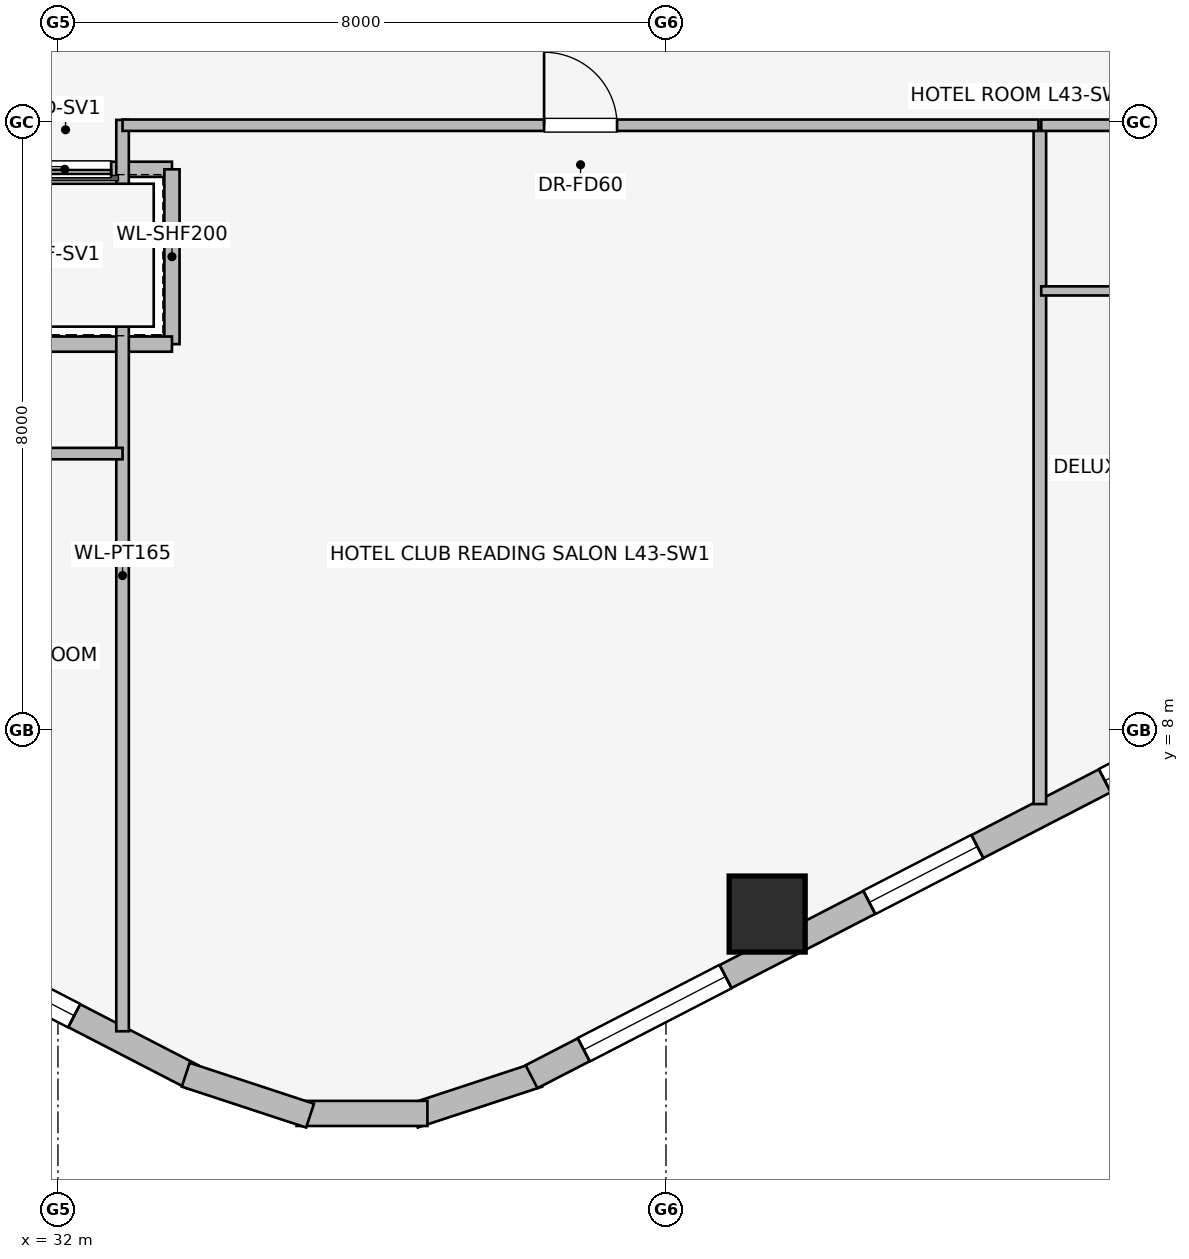
"""IFC4 building model, lengths in metres.
Left out: names, types, materials, properties, quantities, classifications, styles, units other than length and angle.
Written with IfcOpenShell. Run it as: python <this file> out.ifc"""

import sys

from ifc_helpers import new_model, si_unit, direction, frame, frame_2d, origin, origin_2d, place, context, subcontext, project, spatial, rectangle, extrude, element, fill, save


model = new_model("IFC4")
c1 = context("Model", 3, precision=1e-05, world=origin(), true_north=direction((0.0, 1.0)))
c2 = subcontext(c1, "Body", "Model", "MODEL_VIEW")
j1 = project(units=[si_unit("LENGTHUNIT", "METRE"), si_unit("PLANEANGLEUNIT", "RADIAN")], contexts=[c1])
p1 = place(None, origin())
s1 = spatial("IfcSite", under=j1, at=p1, CompositionType="ELEMENT")
p2 = place(p1, origin())
s2 = spatial("IfcBuilding", under=s1, at=p2, CompositionType="ELEMENT")
p3 = place(p2, frame((0.0, 0.0, 160.2)))
s3 = spatial("IfcBuildingStorey", under=s2, at=p3, CompositionType="ELEMENT", Elevation=160.2)
p4 = place(p3, frame((41.331, 5.582, 0.0), z_axis=(0.0, 0.0, 1.0), x_axis=(1.0, 0.0, 0.0)))
e1 = element("IfcColumn", 1, at=p4, inside=s3, PredefinedType="COLUMN", context=c2, shape_type="SweptSolid", body=[
    extrude(rectangle(XDim=1.0, YDim=1.0, at=origin_2d()), origin(), (0.0, 0.0, 1.0), 3.45),
])
p5 = place(p3, frame((33.769, 3.442, 0.0), z_axis=(0.0, 0.0, 1.0), x_axis=(-0.888613612362, 0.458656568606, 0.0)))
e2 = element("IfcWall", 2, at=p5, inside=s3, PredefinedType="STANDARD", context=c2, shape_type="SweptSolid", body=[
    extrude(rectangle(XDim=18.681, YDim=0.34, at=frame_2d((9.34, 0.0))), origin(), (0.0, 0.0, 1.0), 3.03),
])
p6 = place(p5, frame((1.75, 0.0, 0.75)))
e3 = element("IfcOpeningElement", 3, at=p6, cuts=e2, PredefinedType="OPENING", context=c2, shape_type="SweptSolid", body=[
    extrude(rectangle(XDim=1.05, YDim=1.4, at=frame_2d((0.525, 0.7))), frame((0.0, 0.18, 0.0), z_axis=(0.0, -1.0, 0.0), x_axis=(1.0, 0.0, 0.0)), (0.0, 0.0, 1.0), 0.36),
])
p7 = place(p5, frame((7.007, 0.0, 0.75)))
e4 = element("IfcOpeningElement", 4, at=p7, cuts=e2, PredefinedType="OPENING", context=c2, shape_type="SweptSolid", body=[
    extrude(rectangle(XDim=2.1, YDim=1.5, at=frame_2d((1.05, 0.75))), frame((0.0, 0.18, 0.0), z_axis=(0.0, -1.0, 0.0), x_axis=(1.0, 0.0, 0.0)), (0.0, 0.0, 1.0), 0.36),
])
p8 = place(p5, frame((11.774, 0.0, 0.75)))
e5 = element("IfcOpeningElement", 5, at=p8, cuts=e2, PredefinedType="OPENING", context=c2, shape_type="SweptSolid", body=[
    extrude(rectangle(XDim=1.6, YDim=1.55, at=frame_2d((0.8, 0.775))), frame((0.0, 0.18, 0.0), z_axis=(0.0, -1.0, 0.0), x_axis=(1.0, 0.0, 0.0)), (0.0, 0.0, 1.0), 0.36),
])
p9 = place(p5, frame((16.111, 0.0, 0.75)))
e6 = element("IfcOpeningElement", 6, at=p9, cuts=e2, PredefinedType="OPENING", context=c2, shape_type="SweptSolid", body=[
    extrude(rectangle(XDim=1.05, YDim=1.4, at=frame_2d((0.525, 0.7))), frame((0.0, 0.18, 0.0), z_axis=(0.0, -1.0, 0.0), x_axis=(1.0, 0.0, 0.0)), (0.0, 0.0, 1.0), 0.36),
])
for number, where, z_axis, x_axis in (
    (7, (38.319, 3.468, 0.0), (0.0, 0.0, 1.0), (-0.95, -0.312, 0.0)),
    (8, (36.861, 2.959, 0.0), (0.0, 0.0, 1.0), (-1.0, 0.0, 0.0)),
    (9, (35.317, 2.93, 0.0), (0.0, 0.0, 1.0), (-0.95, 0.312, 0.0)),
):
    element("IfcWall", number, at=place(p3, frame(where, z_axis=z_axis, x_axis=x_axis)), inside=s3, PredefinedType="STANDARD", context=c2, shape_type="SweptSolid", body=[
        extrude(rectangle(XDim=1.722, YDim=0.33, at=frame_2d((0.861, 0.0))), origin(), (0.0, 0.0, 1.0), 3.03),
    ])
p10 = place(p3, frame((54.831, 12.01, 0.0), z_axis=(0.0, 0.0, 1.0), x_axis=(-0.888613612362, -0.458656568606, 0.0)))
e10 = element("IfcWall", 10, at=p10, inside=s3, PredefinedType="STANDARD", context=c2, shape_type="SweptSolid", body=[
    extrude(rectangle(XDim=18.681, YDim=0.34, at=frame_2d((9.34, 0.0))), origin(), (0.0, 0.0, 1.0), 3.03),
])
p11 = place(p10, frame((1.023, 0.0, 0.75)))
e11 = element("IfcOpeningElement", 11, at=p11, cuts=e10, PredefinedType="OPENING", context=c2, shape_type="SweptSolid", body=[
    extrude(rectangle(XDim=1.6, YDim=1.55, at=frame_2d((0.8, 0.775))), frame((0.0, 0.18, 0.0), z_axis=(0.0, -1.0, 0.0), x_axis=(1.0, 0.0, 0.0)), (0.0, 0.0, 1.0), 0.36),
])
p12 = place(p10, frame((4.914, 0.0, 0.75)))
e12 = element("IfcOpeningElement", 12, at=p12, cuts=e10, PredefinedType="OPENING", context=c2, shape_type="SweptSolid", body=[
    extrude(rectangle(XDim=2.1, YDim=1.5, at=frame_2d((1.05, 0.75))), frame((0.0, 0.18, 0.0), z_axis=(0.0, -1.0, 0.0), x_axis=(1.0, 0.0, 0.0)), (0.0, 0.0, 1.0), 0.36),
])
p13 = place(p10, frame((8.092, 0.0, 0.75)))
e13 = element("IfcOpeningElement", 13, at=p13, cuts=e10, PredefinedType="OPENING", context=c2, shape_type="SweptSolid", body=[
    extrude(rectangle(XDim=2.1, YDim=1.5, at=frame_2d((1.05, 0.75))), frame((0.0, 0.18, 0.0), z_axis=(0.0, -1.0, 0.0), x_axis=(1.0, 0.0, 0.0)), (0.0, 0.0, 1.0), 0.36),
])
p14 = place(p10, frame((12.08, 0.0, 0.75)))
e14 = element("IfcOpeningElement", 14, at=p14, cuts=e10, PredefinedType="OPENING", context=c2, shape_type="SweptSolid", body=[
    extrude(rectangle(XDim=1.6, YDim=1.55, at=frame_2d((0.8, 0.775))), frame((0.0, 0.18, 0.0), z_axis=(0.0, -1.0, 0.0), x_axis=(1.0, 0.0, 0.0)), (0.0, 0.0, 1.0), 0.36),
])
p15 = place(p10, frame((15.808, 0.0, 0.75)))
e15 = element("IfcOpeningElement", 15, at=p15, cuts=e10, PredefinedType="OPENING", context=c2, shape_type="SweptSolid", body=[
    extrude(rectangle(XDim=2.1, YDim=1.5, at=frame_2d((1.05, 0.75))), frame((0.0, 0.18, 0.0), z_axis=(0.0, -1.0, 0.0), x_axis=(1.0, 0.0, 0.0)), (0.0, 0.0, 1.0), 0.36),
])
p16 = place(p3, frame((33.5, 15.38, 0.0), z_axis=(0.0, 0.0, 1.0), x_axis=(-1.0, 0.0, 0.0)))
e16 = element("IfcWall", 16, at=p16, inside=s3, PredefinedType="PARTITIONING", context=c2, shape_type="SweptSolid", body=[
    extrude(rectangle(XDim=2.82, YDim=0.2, at=frame_2d((1.41, 0.0))), origin(), (0.0, 0.0, 1.0), 3.03),
])
p17 = place(p16, frame((0.8, 0.0, 0.0)))
e17 = element("IfcOpeningElement", 17, at=p17, cuts=e16, PredefinedType="OPENING", context=c2, shape_type="SweptSolid", body=[
    extrude(rectangle(XDim=1.2, YDim=2.2, at=frame_2d((0.6, 1.1))), frame((0.0, 0.11, 0.0), z_axis=(0.0, -1.0, 0.0), x_axis=(1.0, 0.0, 0.0)), (0.0, 0.0, 1.0), 0.22),
])
p18 = place(p3, frame((33.5, 13.08, 0.0), z_axis=(0.0, 0.0, 1.0), x_axis=(0.0, 1.0, 0.0)))
e18 = element("IfcWall", 18, at=p18, inside=s3, PredefinedType="PARTITIONING", context=c2, shape_type="SweptSolid", body=[
    extrude(rectangle(XDim=2.3, YDim=0.2, at=frame_2d((1.15, 0.0))), origin(), (0.0, 0.0, 1.0), 3.03),
])
p19 = place(p3, frame((30.879, 13.08, 0.0), z_axis=(0.0, 0.0, 1.0), x_axis=(1.0, 0.0, 0.0)))
e19 = element("IfcWall", 19, at=p19, inside=s3, PredefinedType="PARTITIONING", context=c2, shape_type="SweptSolid", body=[
    extrude(rectangle(XDim=2.621, YDim=0.2, at=frame_2d((1.311, 0.0))), origin(), (0.0, 0.0, 1.0), 3.03),
])
p20 = place(p3, frame((32.85, 4.04, 0.0), z_axis=(0.0, 0.0, 1.0), x_axis=(0.0, 1.0, 0.0)))
e20 = element("IfcWall", 20, at=p20, inside=s3, PredefinedType="PARTITIONING", context=c2, shape_type="SweptSolid", body=[
    extrude(rectangle(XDim=11.99, YDim=0.165, at=frame_2d((5.995, 0.0))), origin(), (0.0, 0.0, 1.0), 3.03),
])
p21 = place(p3, frame((18.126, 11.64, 0.0), z_axis=(0.0, 0.0, 1.0), x_axis=(1.0, 0.0, 0.0)))
e21 = element("IfcWall", 21, at=p21, inside=s3, PredefinedType="PARTITIONING", context=c2, shape_type="SweptSolid", body=[
    extrude(rectangle(XDim=14.724, YDim=0.15, at=frame_2d((7.362, 0.0))), origin(), (0.0, 0.0, 1.0), 3.03),
])
p22 = place(p21, frame((4.274, 0.0, 0.0)))
e22 = element("IfcOpeningElement", 22, at=p22, cuts=e21, PredefinedType="OPENING", context=c2, shape_type="SweptSolid", body=[
    extrude(rectangle(XDim=0.9, YDim=2.0, at=frame_2d((0.45, 1.0))), frame((0.0, 0.085, 0.0), z_axis=(0.0, -1.0, 0.0), x_axis=(1.0, 0.0, 0.0)), (0.0, 0.0, 1.0), 0.17),
])
p23 = place(p21, frame((7.724, 0.0, 0.0)))
e23 = element("IfcOpeningElement", 23, at=p23, cuts=e21, PredefinedType="OPENING", context=c2, shape_type="SweptSolid", body=[
    extrude(rectangle(XDim=0.9, YDim=2.0, at=frame_2d((0.45, 1.0))), frame((0.0, 0.085, 0.0), z_axis=(0.0, -1.0, 0.0), x_axis=(1.0, 0.0, 0.0)), (0.0, 0.0, 1.0), 0.17),
])
p24 = place(p3, frame((44.919, 7.029, 0.0), z_axis=(0.0, 0.0, 1.0), x_axis=(0.0, 1.0, 0.0)))
e24 = element("IfcWall", 24, at=p24, inside=s3, PredefinedType="PARTITIONING", context=c2, shape_type="SweptSolid", body=[
    extrude(rectangle(XDim=8.901, YDim=0.165, at=frame_2d((4.45, 0.0))), origin(), (0.0, 0.0, 1.0), 3.03),
])
p25 = place(p3, frame((32.85, 15.96, 0.0), z_axis=(0.0, 0.0, 1.0), x_axis=(1.0, 0.0, 0.0)))
e25 = element("IfcWall", 25, at=p25, inside=s3, PredefinedType="PARTITIONING", context=c2, shape_type="SweptSolid", body=[
    extrude(rectangle(XDim=12.051, YDim=0.15, at=frame_2d((6.025, 0.0))), origin(), (0.0, 0.0, 1.0), 3.03),
])
p26 = place(p25, frame((5.546, 0.0, 0.0)))
e26 = element("IfcOpeningElement", 26, at=p26, cuts=e25, PredefinedType="OPENING", context=c2, shape_type="SweptSolid", body=[
    extrude(rectangle(XDim=0.96, YDim=2.0, at=frame_2d((0.48, 1.0))), frame((0.0, 0.085, 0.0), z_axis=(0.0, -1.0, 0.0), x_axis=(1.0, 0.0, 0.0)), (0.0, 0.0, 1.0), 0.17),
])
p27 = place(p3, frame((44.937, 13.78, 0.0), z_axis=(0.0, 0.0, 1.0), x_axis=(1.0, 0.0, 0.0)))
e27 = element("IfcWall", 27, at=p27, inside=s3, PredefinedType="PARTITIONING", context=c2, shape_type="SweptSolid", body=[
    extrude(rectangle(XDim=2.32, YDim=0.12, at=frame_2d((1.16, 0.0))), origin(), (0.0, 0.0, 1.0), 3.03),
])
p28 = place(p3, frame((44.937, 15.96, 0.0), z_axis=(0.0, 0.0, 1.0), x_axis=(1.0, 0.0, 0.0)))
e28 = element("IfcWall", 28, at=p28, inside=s3, PredefinedType="PARTITIONING", context=c2, shape_type="SweptSolid", body=[
    extrude(rectangle(XDim=12.271, YDim=0.15, at=frame_2d((6.135, 0.0))), origin(), (0.0, 0.0, 1.0), 3.03),
])
p29 = place(p28, frame((6.269, 0.0, 0.0)))
e29 = element("IfcOpeningElement", 29, at=p29, cuts=e28, PredefinedType="OPENING", context=c2, shape_type="SweptSolid", body=[
    extrude(rectangle(XDim=0.96, YDim=2.0, at=frame_2d((0.48, 1.0))), frame((0.0, 0.085, 0.0), z_axis=(0.0, -1.0, 0.0), x_axis=(1.0, 0.0, 0.0)), (0.0, 0.0, 1.0), 0.17),
])
p30 = place(p6, origin())
e30 = element("IfcWindow", 30, at=p30, inside=s3, PartitioningType="SINGLE_PANEL", PredefinedType="WINDOW", context=c2, shape_type="SweptSolid", body=[
    extrude(rectangle(XDim=1.05, YDim=1.4, at=frame_2d((0.525, 0.7))), frame((0.0, 0.03, 0.0), z_axis=(0.0, -1.0, 0.0), x_axis=(1.0, 0.0, 0.0)), (0.0, 0.0, 1.0), 0.06),
])
fill(e3, e30)
p31 = place(p13, origin())
e31 = element("IfcWindow", 31, at=p31, inside=s3, PartitioningType="SINGLE_PANEL", PredefinedType="WINDOW", context=c2, shape_type="SweptSolid", body=[
    extrude(rectangle(XDim=2.1, YDim=1.5, at=frame_2d((1.05, 0.75))), frame((0.0, 0.03, 0.0), z_axis=(0.0, -1.0, 0.0), x_axis=(1.0, 0.0, 0.0)), (0.0, 0.0, 1.0), 0.06),
])
fill(e13, e31)
p32 = place(p14, origin())
e32 = element("IfcWindow", 32, at=p32, inside=s3, PartitioningType="SINGLE_PANEL", PredefinedType="WINDOW", context=c2, shape_type="SweptSolid", body=[
    extrude(rectangle(XDim=1.6, YDim=1.55, at=frame_2d((0.8, 0.775))), frame((0.0, 0.03, 0.0), z_axis=(0.0, -1.0, 0.0), x_axis=(1.0, 0.0, 0.0)), (0.0, 0.0, 1.0), 0.06),
])
fill(e14, e32)
p33 = place(p15, origin())
e33 = element("IfcWindow", 33, at=p33, inside=s3, PartitioningType="SINGLE_PANEL", PredefinedType="WINDOW", context=c2, shape_type="SweptSolid", body=[
    extrude(rectangle(XDim=2.1, YDim=1.5, at=frame_2d((1.05, 0.75))), frame((0.0, 0.03, 0.0), z_axis=(0.0, -1.0, 0.0), x_axis=(1.0, 0.0, 0.0)), (0.0, 0.0, 1.0), 0.06),
])
fill(e15, e33)
p34 = place(p17, origin())
e34 = element("IfcDoor", 34, at=p34, inside=s3, OperationType="SLIDING_TO_RIGHT", PredefinedType="DOOR", context=c2, shape_type="SweptSolid", body=[
    extrude(rectangle(XDim=1.2, YDim=2.2, at=frame_2d((0.6, 1.1))), frame((0.0, 0.025, 0.0), z_axis=(0.0, -1.0, 0.0), x_axis=(1.0, 0.0, 0.0)), (0.0, 0.0, 1.0), 0.05),
])
fill(e17, e34)
p35 = place(p26, origin())
e35 = element("IfcDoor", 35, at=p35, inside=s3, OperationType="SINGLE_SWING_LEFT", PredefinedType="DOOR", context=c2, shape_type="SweptSolid", body=[
    extrude(rectangle(XDim=0.96, YDim=2.0, at=frame_2d((0.48, 1.0))), frame((0.0, 0.025, 0.0), z_axis=(0.0, -1.0, 0.0), x_axis=(1.0, 0.0, 0.0)), (0.0, 0.0, 1.0), 0.05),
])
fill(e26, e35)
save(model, sys.argv[1])
